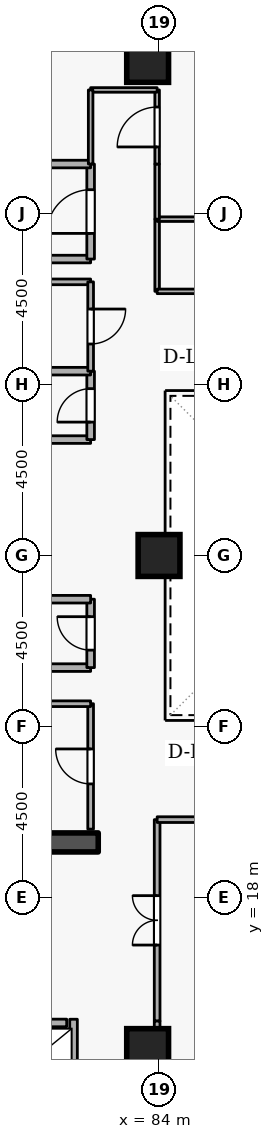
"""IFC4 building model, lengths in metres.
Left out: names, types, materials, properties, quantities, classifications, styles, units other than length and angle.
Written with IfcOpenShell. Run it as: python <this file> out.ifc"""

import sys

from ifc_helpers import new_model, si_unit, direction, frame, frame_2d, origin, origin_2d, place, context, subcontext, project, spatial, rectangle, extrude, element, fill, save


model = new_model("IFC4")
c1 = context("Model", 3, precision=1e-05, world=origin(), true_north=direction((0.0, 1.0)))
c2 = subcontext(c1, "Body", "Model", "MODEL_VIEW")
j1 = project(units=[si_unit("LENGTHUNIT", "METRE"), si_unit("PLANEANGLEUNIT", "RADIAN")], contexts=[c1])
p1 = place(None, origin())
s1 = spatial("IfcSite", under=j1, at=p1, CompositionType="ELEMENT")
p2 = place(p1, origin())
s2 = spatial("IfcBuilding", under=s1, at=p2, CompositionType="ELEMENT")
p3 = place(p2, frame((0.0, 0.0, 145.5)))
s3 = spatial("IfcBuildingStorey", under=s2, at=p3, CompositionType="ELEMENT", Elevation=145.5)
p4 = place(p3, frame((76.6, 19.45, 0.0), z_axis=(0.0, 0.0, 1.0), x_axis=(1.0, 0.0, 0.0)))
e1 = element("IfcWall", 1, at=p4, inside=s3, PredefinedType="SHEAR", context=c2, shape_type="SweptSolid", body=[
    extrude(rectangle(XDim=5.8, YDim=0.5, at=frame_2d((2.9, 0.0))), origin(), (0.0, 0.0, 1.0), 3.6),
])
for number, where, z_axis, x_axis in (
    (2, (83.7, 14.0, 0.0), (0.0, 0.0, 1.0), (1.0, 0.0, 0.0)),
    (3, (83.7, 40.0, 0.0), (0.0, 0.0, 1.0), (1.0, 0.0, 0.0)),
    (4, (84.0, 27.0, 0.0), (0.0, 0.0, 1.0), (1.0, 0.0, 0.0)),
):
    element("IfcColumn", number, at=place(p3, frame(where, z_axis=z_axis, x_axis=x_axis)), inside=s3, PredefinedType="COLUMN", context=c2, shape_type="SweptSolid", body=[
        extrude(rectangle(XDim=1.1, YDim=1.1, at=origin_2d()), origin(), (0.0, 0.0, 1.0), 3.6),
    ])
p5 = place(p3, frame((79.63, 14.7, 0.0), z_axis=(0.0, 0.0, 1.0), x_axis=(1.0, 0.0, 0.0)))
e5 = element("IfcWall", 5, at=p5, inside=s3, PredefinedType="STANDARD", context=c2, shape_type="SweptSolid", body=[
    extrude(rectangle(XDim=1.94, YDim=0.2, at=frame_2d((0.97, 0.0))), origin(), (0.0, 0.0, 1.0), 3.3),
])
p6 = place(p5, frame((0.46, 0.0, 0.0)))
e6 = element("IfcOpeningElement", 6, at=p6, cuts=e5, PredefinedType="OPENING", context=c2, shape_type="SweptSolid", body=[
    extrude(rectangle(XDim=1.02, YDim=2.06, at=frame_2d((0.51, 1.03))), frame((0.0, 0.11, 0.0), z_axis=(0.0, -1.0, 0.0), x_axis=(1.0, 0.0, 0.0)), (0.0, 0.0, 1.0), 0.22),
])
p7 = place(p3, frame((81.75, 12.612, 0.0), z_axis=(0.0, 0.0, 1.0), x_axis=(0.0, 1.0, 0.0)))
e7 = element("IfcWall", 7, at=p7, inside=s3, PredefinedType="STANDARD", context=c2, shape_type="SweptSolid", body=[
    extrude(rectangle(XDim=2.186, YDim=0.2, at=frame_2d((1.093, 0.0))), origin(), (0.0, 0.0, 1.0), 3.3),
])
p8 = place(p3, frame((79.9, 34.8, 0.0), z_axis=(0.0, 0.0, 1.0), x_axis=(1.0, 0.0, 0.0)))
e8 = element("IfcWall", 8, at=p8, inside=s3, PredefinedType="STANDARD", context=c2, shape_type="SweptSolid", body=[
    extrude(rectangle(XDim=2.3, YDim=0.2, at=frame_2d((1.15, 0.0))), origin(), (0.0, 0.0, 1.0), 2.505),
])
p9 = place(p3, frame((82.2, 34.8, 0.0), z_axis=(0.0, 0.0, 1.0), x_axis=(0.0, 1.0, 0.0)))
e9 = element("IfcWall", 9, at=p9, inside=s3, PredefinedType="STANDARD", context=c2, shape_type="SweptSolid", body=[
    extrude(rectangle(XDim=2.5, YDim=0.2, at=frame_2d((1.25, 0.0))), origin(), (0.0, 0.0, 1.0), 3.3),
])
p10 = place(p9, frame((0.675, 0.0, 0.0)))
e10 = element("IfcOpeningElement", 10, at=p10, cuts=e9, PredefinedType="OPENING", context=c2, shape_type="SweptSolid", body=[
    extrude(rectangle(XDim=1.15, YDim=2.1, at=frame_2d((0.575, 1.05))), frame((0.0, 0.11, 0.0), z_axis=(0.0, -1.0, 0.0), x_axis=(1.0, 0.0, 0.0)), (0.0, 0.0, 1.0), 0.22),
])
p11 = place(p3, frame((82.2, 37.3, 0.0), z_axis=(0.0, 0.0, 1.0), x_axis=(-1.0, 0.0, 0.0)))
e11 = element("IfcWall", 11, at=p11, inside=s3, PredefinedType="STANDARD", context=c2, shape_type="SweptSolid", body=[
    extrude(rectangle(XDim=5.7, YDim=0.2, at=frame_2d((2.85, 0.0))), origin(), (0.0, 0.0, 1.0), 3.3),
])
p12 = place(p3, frame((80.15, 24.05, 0.0), z_axis=(0.0, 0.0, 1.0), x_axis=(1.0, 0.0, 0.0)))
e12 = element("IfcWall", 12, at=p12, inside=s3, PredefinedType="STANDARD", context=c2, shape_type="SweptSolid", body=[
    extrude(rectangle(XDim=2.05, YDim=0.2, at=frame_2d((1.025, 0.0))), origin(), (0.0, 0.0, 1.0), 3.3),
])
p13 = place(p3, frame((82.2, 24.05, 0.0), z_axis=(0.0, 0.0, 1.0), x_axis=(0.0, 1.0, 0.0)))
e13 = element("IfcWall", 13, at=p13, inside=s3, PredefinedType="STANDARD", context=c2, shape_type="SweptSolid", body=[
    extrude(rectangle(XDim=1.8, YDim=0.2, at=frame_2d((0.9, 0.0))), origin(), (0.0, 0.0, 1.0), 3.3),
])
p14 = place(p13, frame((0.46, 0.0, 0.0)))
e14 = element("IfcOpeningElement", 14, at=p14, cuts=e13, PredefinedType="OPENING", context=c2, shape_type="SweptSolid", body=[
    extrude(rectangle(XDim=0.88, YDim=2.04, at=frame_2d((0.44, 1.02))), frame((0.0, 0.11, 0.0), z_axis=(0.0, -1.0, 0.0), x_axis=(1.0, 0.0, 0.0)), (0.0, 0.0, 1.0), 0.22),
])
for number, where, z_axis, x_axis in (
    (15, (82.2, 25.85, 0.0), (0.0, 0.0, 1.0), (-1.0, 0.0, 0.0)),
    (16, (80.15, 30.05, 0.0), (0.0, 0.0, 1.0), (1.0, 0.0, 0.0)),
):
    element("IfcWall", number, at=place(p3, frame(where, z_axis=z_axis, x_axis=x_axis)), inside=s3, PredefinedType="STANDARD", context=c2, shape_type="SweptSolid", body=[
        extrude(rectangle(XDim=2.05, YDim=0.2, at=frame_2d((1.025, 0.0))), origin(), (0.0, 0.0, 1.0), 3.3),
    ])
p15 = place(p3, frame((82.2, 30.05, 0.0), z_axis=(0.0, 0.0, 1.0), x_axis=(0.0, 1.0, 0.0)))
e17 = element("IfcWall", 17, at=p15, inside=s3, PredefinedType="STANDARD", context=c2, shape_type="SweptSolid", body=[
    extrude(rectangle(XDim=1.8, YDim=0.2, at=frame_2d((0.9, 0.0))), origin(), (0.0, 0.0, 1.0), 3.3),
])
p16 = place(p15, frame((0.46, 0.0, 0.0)))
e18 = element("IfcOpeningElement", 18, at=p16, cuts=e17, PredefinedType="OPENING", context=c2, shape_type="SweptSolid", body=[
    extrude(rectangle(XDim=0.88, YDim=2.04, at=frame_2d((0.44, 1.02))), frame((0.0, 0.11, 0.0), z_axis=(0.0, -1.0, 0.0), x_axis=(1.0, 0.0, 0.0)), (0.0, 0.0, 1.0), 0.22),
])
p17 = place(p3, frame((82.2, 31.85, 0.0), z_axis=(0.0, 0.0, 1.0), x_axis=(-1.0, 0.0, 0.0)))
e19 = element("IfcWall", 19, at=p17, inside=s3, PredefinedType="STANDARD", context=c2, shape_type="SweptSolid", body=[
    extrude(rectangle(XDim=2.05, YDim=0.2, at=frame_2d((1.025, 0.0))), origin(), (0.0, 0.0, 1.0), 3.3),
])
p18 = place(p3, frame((82.2, 19.8, 0.0), z_axis=(0.0, 0.0, 1.0), x_axis=(0.0, 1.0, 0.0)))
e20 = element("IfcWall", 20, at=p18, inside=s3, PredefinedType="PARTITIONING", context=c2, shape_type="SweptSolid", body=[
    extrude(rectangle(XDim=3.3, YDim=0.15, at=frame_2d((1.65, 0.0))), origin(), (0.0, 0.0, 1.0), 3.3),
])
p19 = place(p18, frame((1.19, 0.0, 0.0)))
e21 = element("IfcOpeningElement", 21, at=p19, cuts=e20, PredefinedType="OPENING", context=c2, shape_type="SweptSolid", body=[
    extrude(rectangle(XDim=0.92, YDim=2.08, at=frame_2d((0.46, 1.04))), frame((0.0, 0.085, 0.0), z_axis=(0.0, -1.0, 0.0), x_axis=(1.0, 0.0, 0.0)), (0.0, 0.0, 1.0), 0.17),
])
p20 = place(p3, frame((82.2, 23.1, 0.0), z_axis=(0.0, 0.0, 1.0), x_axis=(-1.0, 0.0, 0.0)))
e22 = element("IfcWall", 22, at=p20, inside=s3, PredefinedType="PARTITIONING", context=c2, shape_type="SweptSolid", body=[
    extrude(rectangle(XDim=2.05, YDim=0.15, at=frame_2d((1.025, 0.0))), origin(), (0.0, 0.0, 1.0), 3.3),
])
p21 = place(p3, frame((80.15, 34.2, 0.0), z_axis=(0.0, 0.0, 1.0), x_axis=(1.0, 0.0, 0.0)))
e23 = element("IfcWall", 23, at=p21, inside=s3, PredefinedType="PARTITIONING", context=c2, shape_type="SweptSolid", body=[
    extrude(rectangle(XDim=2.05, YDim=0.15, at=frame_2d((1.025, 0.0))), origin(), (0.0, 0.0, 1.0), 2.505),
])
p22 = place(p3, frame((82.2, 34.2, 0.0), z_axis=(0.0, 0.0, 1.0), x_axis=(0.0, -1.0, 0.0)))
e24 = element("IfcWall", 24, at=p22, inside=s3, PredefinedType="PARTITIONING", context=c2, shape_type="SweptSolid", body=[
    extrude(rectangle(XDim=2.35, YDim=0.15, at=frame_2d((1.175, 0.0))), origin(), (0.0, 0.0, 1.0), 3.3),
])
p23 = place(p22, frame((0.715, 0.0, 0.0)))
e25 = element("IfcOpeningElement", 25, at=p23, cuts=e24, PredefinedType="OPENING", context=c2, shape_type="SweptSolid", body=[
    extrude(rectangle(XDim=0.92, YDim=2.08, at=frame_2d((0.46, 1.04))), frame((0.0, 0.085, 0.0), z_axis=(0.0, -1.0, 0.0), x_axis=(1.0, 0.0, 0.0)), (0.0, 0.0, 1.0), 0.17),
])
p24 = place(p3, frame((83.95, 14.75, 0.0), z_axis=(0.0, 0.0, 1.0), x_axis=(0.0, 1.0, 0.0)))
e26 = element("IfcWall", 26, at=p24, inside=s3, PredefinedType="PARTITIONING", context=c2, shape_type="SweptSolid", body=[
    extrude(rectangle(XDim=5.3, YDim=0.15, at=frame_2d((2.65, 0.0))), origin(), (0.0, 0.0, 1.0), 3.3),
])
p25 = place(p24, frame((2.0, 0.0, 0.0)))
e27 = element("IfcOpeningElement", 27, at=p25, cuts=e26, PredefinedType="OPENING", context=c2, shape_type="SweptSolid", body=[
    extrude(rectangle(XDim=1.3, YDim=2.12, at=frame_2d((0.65, 1.06))), frame((0.0, 0.085, 0.0), z_axis=(0.0, -1.0, 0.0), x_axis=(1.0, 0.0, 0.0)), (0.0, 0.0, 1.0), 0.17),
])
p26 = place(p3, frame((83.95, 20.05, 0.0), z_axis=(0.0, 0.0, 1.0), x_axis=(1.0, 0.0, 0.0)))
e28 = element("IfcWall", 28, at=p26, inside=s3, PredefinedType="PARTITIONING", context=c2, shape_type="SweptSolid", body=[
    extrude(rectangle(XDim=2.25, YDim=0.15, at=frame_2d((1.125, 0.0))), origin(), (0.0, 0.0, 1.0), 3.3),
])
p27 = place(p3, frame((83.95, 12.4, 0.0), z_axis=(0.0, 0.0, 1.0), x_axis=(0.0, 1.0, 0.0)))
e29 = element("IfcWall", 29, at=p27, inside=s3, PredefinedType="PARTITIONING", context=c2, shape_type="SweptSolid", body=[
    extrude(rectangle(XDim=2.35, YDim=0.15, at=frame_2d((1.175, 0.0))), origin(), (0.0, 0.0, 1.0), 3.3),
])
p28 = place(p3, frame((83.95, 33.95, 0.0), z_axis=(0.0, 0.0, 1.0), x_axis=(0.0, 1.0, 0.0)))
e30 = element("IfcWall", 30, at=p28, inside=s3, PredefinedType="PARTITIONING", context=c2, shape_type="SweptSolid", body=[
    extrude(rectangle(XDim=1.9, YDim=0.12, at=frame_2d((0.95, 0.0))), origin(), (0.0, 0.0, 1.0), 3.3),
])
p29 = place(p3, frame((83.95, 35.85, 0.0), z_axis=(0.0, 0.0, 1.0), x_axis=(1.0, 0.0, 0.0)))
e31 = element("IfcWall", 31, at=p29, inside=s3, PredefinedType="PARTITIONING", context=c2, shape_type="SweptSolid", body=[
    extrude(rectangle(XDim=4.55, YDim=0.12, at=frame_2d((2.275, 0.0))), origin(), (0.0, 0.0, 1.0), 3.3),
])
p30 = place(p3, frame((88.5, 33.95, 0.0), z_axis=(0.0, 0.0, 1.0), x_axis=(-1.0, 0.0, 0.0)))
e32 = element("IfcWall", 32, at=p30, inside=s3, PredefinedType="PARTITIONING", context=c2, shape_type="SweptSolid", body=[
    extrude(rectangle(XDim=4.55, YDim=0.12, at=frame_2d((2.275, 0.0))), origin(), (0.0, 0.0, 1.0), 3.3),
])
p31 = place(p30, frame((1.8, 0.0, 0.0)))
e33 = element("IfcOpeningElement", 33, at=p31, cuts=e32, PredefinedType="OPENING", context=c2, shape_type="SweptSolid", body=[
    extrude(rectangle(XDim=0.95, YDim=2.1, at=frame_2d((0.475, 1.05))), frame((0.0, 0.07, 0.0), z_axis=(0.0, -1.0, 0.0), x_axis=(1.0, 0.0, 0.0)), (0.0, 0.0, 1.0), 0.14),
])
p32 = place(p3, frame((83.95, 35.85, 0.0), z_axis=(0.0, 0.0, 1.0), x_axis=(0.0, 1.0, 0.0)))
e34 = element("IfcWall", 34, at=p32, inside=s3, PredefinedType="PARTITIONING", context=c2, shape_type="SweptSolid", body=[
    extrude(rectangle(XDim=1.45, YDim=0.12, at=frame_2d((0.725, 0.0))), origin(), (0.0, 0.0, 1.0), 3.3),
])
p33 = place(p3, frame((83.95, 37.3, 0.0), z_axis=(0.0, 0.0, 1.0), x_axis=(0.0, 1.0, 0.0)))
e35 = element("IfcWall", 35, at=p33, inside=s3, PredefinedType="PARTITIONING", context=c2, shape_type="SweptSolid", body=[
    extrude(rectangle(XDim=1.95, YDim=0.12, at=frame_2d((0.975, 0.0))), origin(), (0.0, 0.0, 1.0), 3.3),
])
p34 = place(p33, frame((0.45, 0.0, 0.0)))
e36 = element("IfcOpeningElement", 36, at=p34, cuts=e35, PredefinedType="OPENING", context=c2, shape_type="SweptSolid", body=[
    extrude(rectangle(XDim=1.05, YDim=2.1, at=frame_2d((0.525, 1.05))), frame((0.0, 0.07, 0.0), z_axis=(0.0, -1.0, 0.0), x_axis=(1.0, 0.0, 0.0)), (0.0, 0.0, 1.0), 0.14),
])
p35 = place(p3, frame((83.95, 39.25, 0.0), z_axis=(0.0, 0.0, 1.0), x_axis=(-1.0, 0.0, 0.0)))
e37 = element("IfcWall", 37, at=p35, inside=s3, PredefinedType="PARTITIONING", context=c2, shape_type="SweptSolid", body=[
    extrude(rectangle(XDim=1.75, YDim=0.12, at=frame_2d((0.875, 0.0))), origin(), (0.0, 0.0, 1.0), 3.3),
])
p36 = place(p3, frame((82.2, 39.25, 0.0), z_axis=(0.0, 0.0, 1.0), x_axis=(0.0, -1.0, 0.0)))
e38 = element("IfcWall", 38, at=p36, inside=s3, PredefinedType="PARTITIONING", context=c2, shape_type="SweptSolid", body=[
    extrude(rectangle(XDim=1.95, YDim=0.12, at=frame_2d((0.975, 0.0))), origin(), (0.0, 0.0, 1.0), 3.3),
])
p37 = place(p10, origin())
e39 = element("IfcDoor", 39, at=p37, inside=s3, OperationType="SINGLE_SWING_LEFT", PredefinedType="DOOR", context=c2, shape_type="SweptSolid", body=[
    extrude(rectangle(XDim=1.15, YDim=2.1, at=frame_2d((0.575, 1.05))), frame((0.0, 0.025, 0.0), z_axis=(0.0, -1.0, 0.0), x_axis=(1.0, 0.0, 0.0)), (0.0, 0.0, 1.0), 0.05),
])
fill(e10, e39)
p38 = place(p14, origin())
e40 = element("IfcDoor", 40, at=p38, inside=s3, OperationType="SINGLE_SWING_RIGHT", PredefinedType="DOOR", context=c2, shape_type="SweptSolid", body=[
    extrude(rectangle(XDim=0.88, YDim=2.04, at=frame_2d((0.44, 1.02))), frame((0.0, 0.025, 0.0), z_axis=(0.0, -1.0, 0.0), x_axis=(1.0, 0.0, 0.0)), (0.0, 0.0, 1.0), 0.05),
])
fill(e14, e40)
p39 = place(p16, origin())
e41 = element("IfcDoor", 41, at=p39, inside=s3, OperationType="SINGLE_SWING_LEFT", PredefinedType="DOOR", context=c2, shape_type="SweptSolid", body=[
    extrude(rectangle(XDim=0.88, YDim=2.04, at=frame_2d((0.44, 1.02))), frame((0.0, 0.025, 0.0), z_axis=(0.0, -1.0, 0.0), x_axis=(1.0, 0.0, 0.0)), (0.0, 0.0, 1.0), 0.05),
])
fill(e18, e41)
p40 = place(p19, origin())
e42 = element("IfcDoor", 42, at=p40, inside=s3, OperationType="SINGLE_SWING_RIGHT", PredefinedType="DOOR", context=c2, shape_type="SweptSolid", body=[
    extrude(rectangle(XDim=0.92, YDim=2.08, at=frame_2d((0.46, 1.04))), frame((0.0, 0.025, 0.0), z_axis=(0.0, -1.0, 0.0), x_axis=(1.0, 0.0, 0.0)), (0.0, 0.0, 1.0), 0.05),
])
fill(e21, e42)
p41 = place(p23, origin())
e43 = element("IfcDoor", 43, at=p41, inside=s3, OperationType="SINGLE_SWING_LEFT", PredefinedType="DOOR", context=c2, shape_type="SweptSolid", body=[
    extrude(rectangle(XDim=0.92, YDim=2.08, at=frame_2d((0.46, 1.04))), frame((0.0, 0.025, 0.0), z_axis=(0.0, -1.0, 0.0), x_axis=(1.0, 0.0, 0.0)), (0.0, 0.0, 1.0), 0.05),
])
fill(e25, e43)
p42 = place(p25, origin())
e44 = element("IfcDoor", 44, at=p42, inside=s3, OperationType="DOUBLE_DOOR_SINGLE_SWING", PredefinedType="DOOR", context=c2, shape_type="SweptSolid", body=[
    extrude(rectangle(XDim=1.3, YDim=2.12, at=frame_2d((0.65, 1.06))), frame((0.0, 0.025, 0.0), z_axis=(0.0, -1.0, 0.0), x_axis=(1.0, 0.0, 0.0)), (0.0, 0.0, 1.0), 0.05),
])
fill(e27, e44)
p43 = place(p34, origin())
e45 = element("IfcDoor", 45, at=p43, inside=s3, OperationType="SINGLE_SWING_LEFT", PredefinedType="DOOR", context=c2, shape_type="SweptSolid", body=[
    extrude(rectangle(XDim=1.05, YDim=2.1, at=frame_2d((0.525, 1.05))), frame((0.0, 0.025, 0.0), z_axis=(0.0, -1.0, 0.0), x_axis=(1.0, 0.0, 0.0)), (0.0, 0.0, 1.0), 0.05),
])
fill(e36, e45)
save(model, sys.argv[1])
